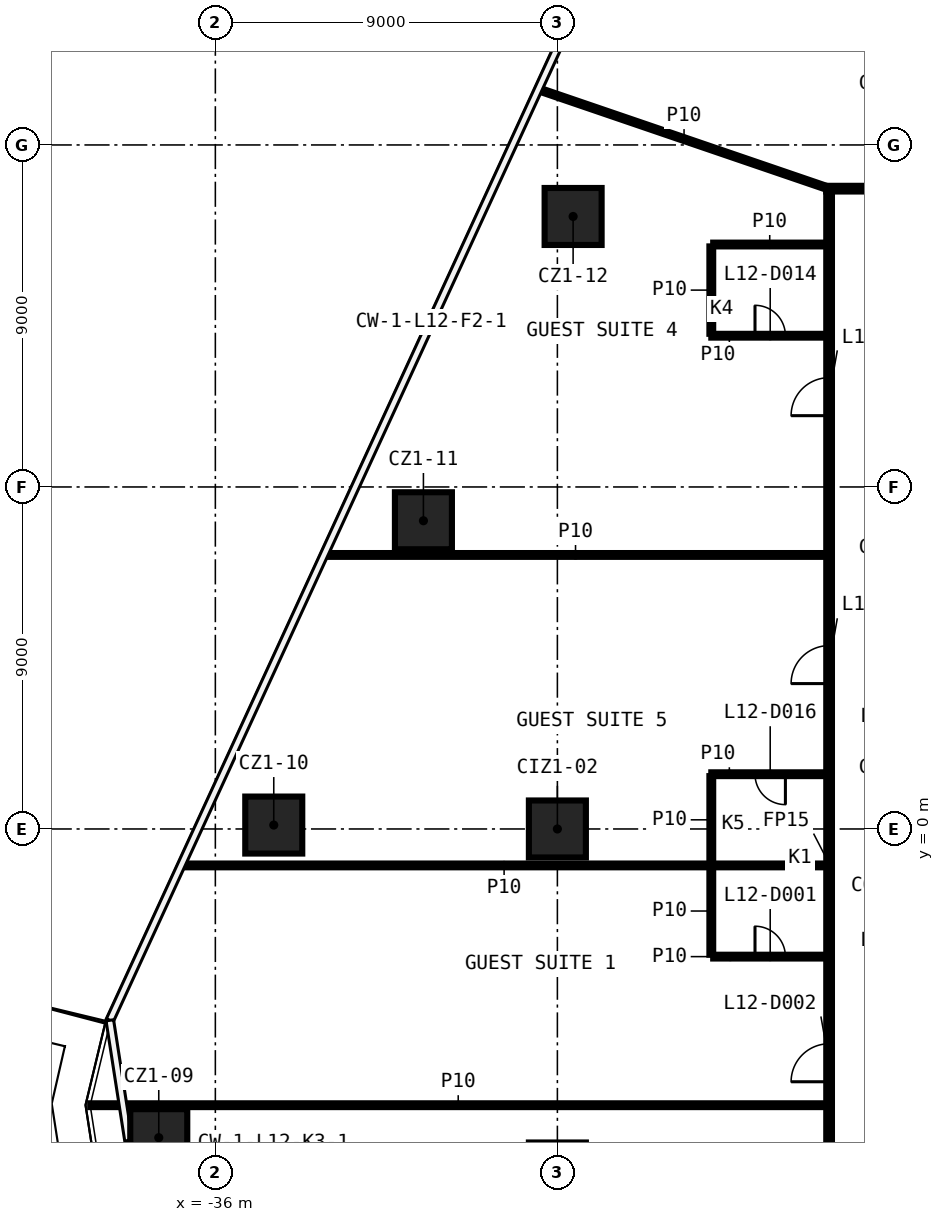
"""IFC4 building model, lengths in metres.
Left out: names, types, materials, properties, quantities, classifications, styles, units other than length and angle.
Written with IfcOpenShell. Run it as: python <this file> out.ifc"""

import sys

from ifc_helpers import new_model, si_unit, direction, frame, frame_2d, origin, origin_2d, place, context, subcontext, project, spatial, rectangle, extrude, element, fill, save


model = new_model("IFC4")
c1 = context("Model", 3, precision=1e-05, world=origin(), true_north=direction((0.0, 1.0)))
c2 = subcontext(c1, "Body", "Model", "MODEL_VIEW")
j1 = project(units=[si_unit("LENGTHUNIT", "METRE"), si_unit("PLANEANGLEUNIT", "RADIAN")], contexts=[c1])
p1 = place(None, origin())
s1 = spatial("IfcSite", under=j1, at=p1, CompositionType="ELEMENT")
p2 = place(p1, origin())
s2 = spatial("IfcBuilding", under=s1, at=p2, CompositionType="ELEMENT")
p3 = place(p2, frame((0.0, 0.0, 66.2)))
s3 = spatial("IfcBuildingStorey", under=s2, at=p3, CompositionType="ELEMENT", Elevation=66.2)
for number, where, z_axis, x_axis in (
    (1, (-37.489, -8.123, 0.0), (0.0, 0.0, 1.0), (1.0, 0.0, 0.0)),
    (2, (-34.463, 0.103, 0.0), (0.0, 0.0, 1.0), (1.0, 0.0, 0.0)),
    (3, (-30.525, 8.111, 0.0), (0.0, 0.0, 1.0), (1.0, 0.0, 0.0)),
    (4, (-26.586, 16.118, 0.0), (0.0, 0.0, 1.0), (1.0, 0.0, 0.0)),
    (5, (-27.0, 0.0, 0.0), (0.0, 0.0, 1.0), (1.0, 0.0, 0.0)),
):
    element("IfcColumn", number, at=place(p3, frame(where, z_axis=z_axis, x_axis=x_axis)), inside=s3, PredefinedType="COLUMN", context=c2, shape_type="SweptSolid", body=[
        extrude(rectangle(XDim=1.5, YDim=1.5, at=origin_2d()), origin(), (0.0, 0.0, 1.0), 3.3),
    ])
p4 = place(p3, frame((-39.293, -7.269, 0.0), z_axis=(0.0, 0.0, 1.0), x_axis=(1.0, 0.0, 0.0)))
e6 = element("IfcWall", 6, at=p4, inside=s3, PredefinedType="PARTITIONING", context=c2, shape_type="SweptSolid", body=[
    extrude(rectangle(XDim=19.368, YDim=0.1, at=frame_2d((9.684, 0.0))), origin(), (0.0, 0.0, 1.0), 3.3),
])
p5 = place(p3, frame((-22.9, -3.359, 0.0), z_axis=(0.0, 0.0, 1.0), x_axis=(1.0, 0.0, 0.0)))
e7 = element("IfcWall", 7, at=p5, inside=s3, PredefinedType="PARTITIONING", context=c2, shape_type="SweptSolid", body=[
    extrude(rectangle(XDim=2.975, YDim=0.1, at=frame_2d((1.487, 0.0))), origin(), (0.0, 0.0, 1.0), 3.3),
])
p6 = place(p5, frame((1.1, 0.0, 0.0)))
e8 = element("IfcOpeningElement", 8, at=p6, cuts=e7, PredefinedType="OPENING", context=c2, shape_type="SweptSolid", body=[
    extrude(rectangle(XDim=0.8, YDim=2.1, at=frame_2d((0.4, 1.05))), frame((0.0, 0.06, 0.0), z_axis=(0.0, -1.0, 0.0), x_axis=(1.0, 0.0, 0.0)), (0.0, 0.0, 1.0), 0.12),
])
p7 = place(p3, frame((-36.879, -0.959, 0.0), z_axis=(0.0, 0.0, 1.0), x_axis=(1.0, 0.0, 0.0)))
e9 = element("IfcWall", 9, at=p7, inside=s3, PredefinedType="PARTITIONING", context=c2, shape_type="SweptSolid", body=[
    extrude(rectangle(XDim=16.954, YDim=0.1, at=frame_2d((8.477, 0.0))), origin(), (0.0, 0.0, 1.0), 3.3),
])
p8 = place(p3, frame((-19.925, 1.441, 0.0), z_axis=(0.0, 0.0, 1.0), x_axis=(-1.0, 0.0, 0.0)))
e10 = element("IfcWall", 10, at=p8, inside=s3, PredefinedType="PARTITIONING", context=c2, shape_type="SweptSolid", body=[
    extrude(rectangle(XDim=3.025, YDim=0.1, at=frame_2d((1.512, 0.0))), origin(), (0.0, 0.0, 1.0), 3.3),
])
p9 = place(p8, frame((1.075, 0.0, 0.0)))
e11 = element("IfcOpeningElement", 11, at=p9, cuts=e10, PredefinedType="OPENING", context=c2, shape_type="SweptSolid", body=[
    extrude(rectangle(XDim=0.8, YDim=2.1, at=frame_2d((0.4, 1.05))), frame((0.0, 0.06, 0.0), z_axis=(0.0, -1.0, 0.0), x_axis=(1.0, 0.0, 0.0)), (0.0, 0.0, 1.0), 0.12),
])
p10 = place(p3, frame((-33.12, 7.211, 0.0), z_axis=(0.0, 0.0, 1.0), x_axis=(1.0, 0.0, 0.0)))
e12 = element("IfcWall", 12, at=p10, inside=s3, PredefinedType="PARTITIONING", context=c2, shape_type="SweptSolid", body=[
    extrude(rectangle(XDim=13.195, YDim=0.1, at=frame_2d((6.597, 0.0))), origin(), (0.0, 0.0, 1.0), 3.3),
])
p11 = place(p3, frame((-22.95, 12.98, 0.0), z_axis=(0.0, 0.0, 1.0), x_axis=(1.0, 0.0, 0.0)))
e13 = element("IfcWall", 13, at=p11, inside=s3, PredefinedType="PARTITIONING", context=c2, shape_type="SweptSolid", body=[
    extrude(rectangle(XDim=3.025, YDim=0.1, at=frame_2d((1.512, 0.0))), origin(), (0.0, 0.0, 1.0), 3.3),
])
p12 = place(p11, frame((1.15, 0.0, 0.0)))
e14 = element("IfcOpeningElement", 14, at=p12, cuts=e13, PredefinedType="OPENING", context=c2, shape_type="SweptSolid", body=[
    extrude(rectangle(XDim=0.8, YDim=2.1, at=frame_2d((0.4, 1.05))), frame((0.0, 0.06, 0.0), z_axis=(0.0, -1.0, 0.0), x_axis=(1.0, 0.0, 0.0)), (0.0, 0.0, 1.0), 0.12),
])
p13 = place(p3, frame((-22.9, 15.38, 0.0), z_axis=(0.0, 0.0, 1.0), x_axis=(1.0, 0.0, 0.0)))
e15 = element("IfcWall", 15, at=p13, inside=s3, PredefinedType="PARTITIONING", context=c2, shape_type="SweptSolid", body=[
    extrude(rectangle(XDim=2.975, YDim=0.1, at=frame_2d((1.487, 0.0))), origin(), (0.0, 0.0, 1.0), 3.3),
])
p14 = place(p3, frame((-19.925, 16.85, 0.0), z_axis=(0.0, 0.0, 1.0), x_axis=(1.0, 0.0, 0.0)))
e16 = element("IfcWall", 16, at=p14, inside=s3, PredefinedType="PARTITIONING", context=c2, shape_type="SweptSolid", body=[
    extrude(rectangle(XDim=39.85, YDim=0.15, at=frame_2d((19.925, 0.0))), origin(), (0.0, 0.0, 1.0), 3.3),
])
p15 = place(p14, frame((31.436, 0.0, 0.0)))
e17 = element("IfcOpeningElement", 17, at=p15, cuts=e16, PredefinedType="OPENING", context=c2, shape_type="SweptSolid", body=[
    extrude(rectangle(XDim=0.9, YDim=2.1, at=frame_2d((0.45, 1.05))), frame((0.0, 0.085, 0.0), z_axis=(0.0, -1.0, 0.0), x_axis=(1.0, 0.0, 0.0)), (0.0, 0.0, 1.0), 0.17),
])
p16 = place(p14, frame((16.954, 0.0, 0.0)))
e18 = element("IfcOpeningElement", 18, at=p16, cuts=e16, PredefinedType="OPENING", context=c2, shape_type="SweptSolid", body=[
    extrude(rectangle(XDim=0.9, YDim=2.1, at=frame_2d((0.45, 1.05))), frame((0.0, 0.085, 0.0), z_axis=(0.0, -1.0, 0.0), x_axis=(1.0, 0.0, 0.0)), (0.0, 0.0, 1.0), 0.17),
])
p17 = place(p14, frame((7.208, 0.0, 0.0)))
e19 = element("IfcOpeningElement", 19, at=p17, cuts=e16, PredefinedType="OPENING", context=c2, shape_type="SweptSolid", body=[
    extrude(rectangle(XDim=0.9, YDim=2.1, at=frame_2d((0.45, 1.05))), frame((0.0, 0.085, 0.0), z_axis=(0.0, -1.0, 0.0), x_axis=(1.0, 0.0, 0.0)), (0.0, 0.0, 1.0), 0.17),
])
p18 = place(p3, frame((-19.85, -16.775, 0.0), z_axis=(0.0, 0.0, 1.0), x_axis=(0.0, 1.0, 0.0)))
e20 = element("IfcWall", 20, at=p18, inside=s3, PredefinedType="PARTITIONING", context=c2, shape_type="SweptSolid", body=[
    extrude(rectangle(XDim=33.55, YDim=0.15, at=frame_2d((16.775, 0.0))), origin(), (0.0, 0.0, 1.0), 3.3),
])
p19 = place(p18, frame((10.123, 0.0, 0.0)))
e21 = element("IfcOpeningElement", 21, at=p19, cuts=e20, PredefinedType="OPENING", context=c2, shape_type="SweptSolid", body=[
    extrude(rectangle(XDim=1.0, YDim=2.1, at=frame_2d((0.5, 1.05))), frame((0.0, 0.085, 0.0), z_axis=(0.0, -1.0, 0.0), x_axis=(1.0, 0.0, 0.0)), (0.0, 0.0, 1.0), 0.17),
])
p20 = place(p18, frame((4.179, 0.0, 0.0)))
e22 = element("IfcOpeningElement", 22, at=p20, cuts=e20, PredefinedType="OPENING", context=c2, shape_type="SweptSolid", body=[
    extrude(rectangle(XDim=0.9, YDim=2.1, at=frame_2d((0.45, 1.05))), frame((0.0, 0.085, 0.0), z_axis=(0.0, -1.0, 0.0), x_axis=(1.0, 0.0, 0.0)), (0.0, 0.0, 1.0), 0.17),
])
p21 = place(p18, frame((27.651, 0.0, 0.0)))
e23 = element("IfcOpeningElement", 23, at=p21, cuts=e20, PredefinedType="OPENING", context=c2, shape_type="SweptSolid", body=[
    extrude(rectangle(XDim=1.0, YDim=2.1, at=frame_2d((0.5, 1.05))), frame((0.0, 0.085, 0.0), z_axis=(0.0, -1.0, 0.0), x_axis=(1.0, 0.0, 0.0)), (0.0, 0.0, 1.0), 0.17),
])
p22 = place(p18, frame((20.601, 0.0, 0.0)))
e24 = element("IfcOpeningElement", 24, at=p22, cuts=e20, PredefinedType="OPENING", context=c2, shape_type="SweptSolid", body=[
    extrude(rectangle(XDim=1.0, YDim=2.1, at=frame_2d((0.5, 1.05))), frame((0.0, 0.085, 0.0), z_axis=(0.0, -1.0, 0.0), x_axis=(1.0, 0.0, 0.0)), (0.0, 0.0, 1.0), 0.17),
])
p23 = place(p3, frame((-22.95, -3.309, 0.0), z_axis=(0.0, 0.0, 1.0), x_axis=(0.0, 1.0, 0.0)))
e25 = element("IfcWall", 25, at=p23, inside=s3, PredefinedType="PARTITIONING", context=c2, shape_type="SweptSolid", body=[
    extrude(rectangle(XDim=2.3, YDim=0.1, at=frame_2d((1.15, 0.0))), origin(), (0.0, 0.0, 1.0), 3.3),
])
for number, where, z_axis, x_axis in (
    (26, (-22.95, -0.909, 0.0), (0.0, 0.0, 1.0), (0.0, 1.0, 0.0)),
    (27, (-22.95, 13.03, 0.0), (0.0, 0.0, 1.0), (0.0, 1.0, 0.0)),
):
    element("IfcWall", number, at=place(p3, frame(where, z_axis=z_axis, x_axis=x_axis)), inside=s3, PredefinedType="PARTITIONING", context=c2, shape_type="SweptSolid", body=[
        extrude(rectangle(XDim=2.3, YDim=0.1, at=frame_2d((1.15, 0.0))), origin(), (0.0, 0.0, 1.0), 3.3),
    ])
p24 = place(p3, frame((-27.484, 19.458, 0.0), z_axis=(0.0, 0.0, 1.0), x_axis=(0.946262238114, -0.323400335065, 0.0)))
e28 = element("IfcWall", 28, at=p24, inside=s3, PredefinedType="PARTITIONING", context=c2, shape_type="SweptSolid", body=[
    extrude(rectangle(XDim=8.067, YDim=0.1, at=frame_2d((4.034, 0.0))), origin(), (0.0, 0.0, 1.0), 3.3),
])
p25 = place(p6, origin())
e29 = element("IfcDoor", 29, at=p25, inside=s3, OperationType="SINGLE_SWING_LEFT", PredefinedType="DOOR", context=c2, shape_type="SweptSolid", body=[
    extrude(rectangle(XDim=0.8, YDim=2.1, at=frame_2d((0.4, 1.05))), frame((0.0, 0.025, 0.0), z_axis=(0.0, -1.0, 0.0), x_axis=(1.0, 0.0, 0.0)), (0.0, 0.0, 1.0), 0.05),
])
fill(e8, e29)
p26 = place(p19, origin())
e30 = element("IfcDoor", 30, at=p26, inside=s3, OperationType="SINGLE_SWING_RIGHT", PredefinedType="DOOR", context=c2, shape_type="SweptSolid", body=[
    extrude(rectangle(XDim=1.0, YDim=2.1, at=frame_2d((0.5, 1.05))), frame((0.0, 0.025, 0.0), z_axis=(0.0, -1.0, 0.0), x_axis=(1.0, 0.0, 0.0)), (0.0, 0.0, 1.0), 0.05),
])
fill(e21, e30)
p27 = place(p12, origin())
e31 = element("IfcDoor", 31, at=p27, inside=s3, OperationType="SINGLE_SWING_LEFT", PredefinedType="DOOR", context=c2, shape_type="SweptSolid", body=[
    extrude(rectangle(XDim=0.8, YDim=2.1, at=frame_2d((0.4, 1.05))), frame((0.0, 0.025, 0.0), z_axis=(0.0, -1.0, 0.0), x_axis=(1.0, 0.0, 0.0)), (0.0, 0.0, 1.0), 0.05),
])
fill(e14, e31)
p28 = place(p21, origin())
e32 = element("IfcDoor", 32, at=p28, inside=s3, OperationType="SINGLE_SWING_RIGHT", PredefinedType="DOOR", context=c2, shape_type="SweptSolid", body=[
    extrude(rectangle(XDim=1.0, YDim=2.1, at=frame_2d((0.5, 1.05))), frame((0.0, 0.025, 0.0), z_axis=(0.0, -1.0, 0.0), x_axis=(1.0, 0.0, 0.0)), (0.0, 0.0, 1.0), 0.05),
])
fill(e23, e32)
p29 = place(p9, origin())
e33 = element("IfcDoor", 33, at=p29, inside=s3, OperationType="SINGLE_SWING_RIGHT", PredefinedType="DOOR", context=c2, shape_type="SweptSolid", body=[
    extrude(rectangle(XDim=0.8, YDim=2.1, at=frame_2d((0.4, 1.05))), frame((0.0, 0.025, 0.0), z_axis=(0.0, -1.0, 0.0), x_axis=(1.0, 0.0, 0.0)), (0.0, 0.0, 1.0), 0.05),
])
fill(e11, e33)
p30 = place(p22, origin())
e34 = element("IfcDoor", 34, at=p30, inside=s3, OperationType="SINGLE_SWING_LEFT", PredefinedType="DOOR", context=c2, shape_type="SweptSolid", body=[
    extrude(rectangle(XDim=1.0, YDim=2.1, at=frame_2d((0.5, 1.05))), frame((0.0, 0.025, 0.0), z_axis=(0.0, -1.0, 0.0), x_axis=(1.0, 0.0, 0.0)), (0.0, 0.0, 1.0), 0.05),
])
fill(e24, e34)
save(model, sys.argv[1])
